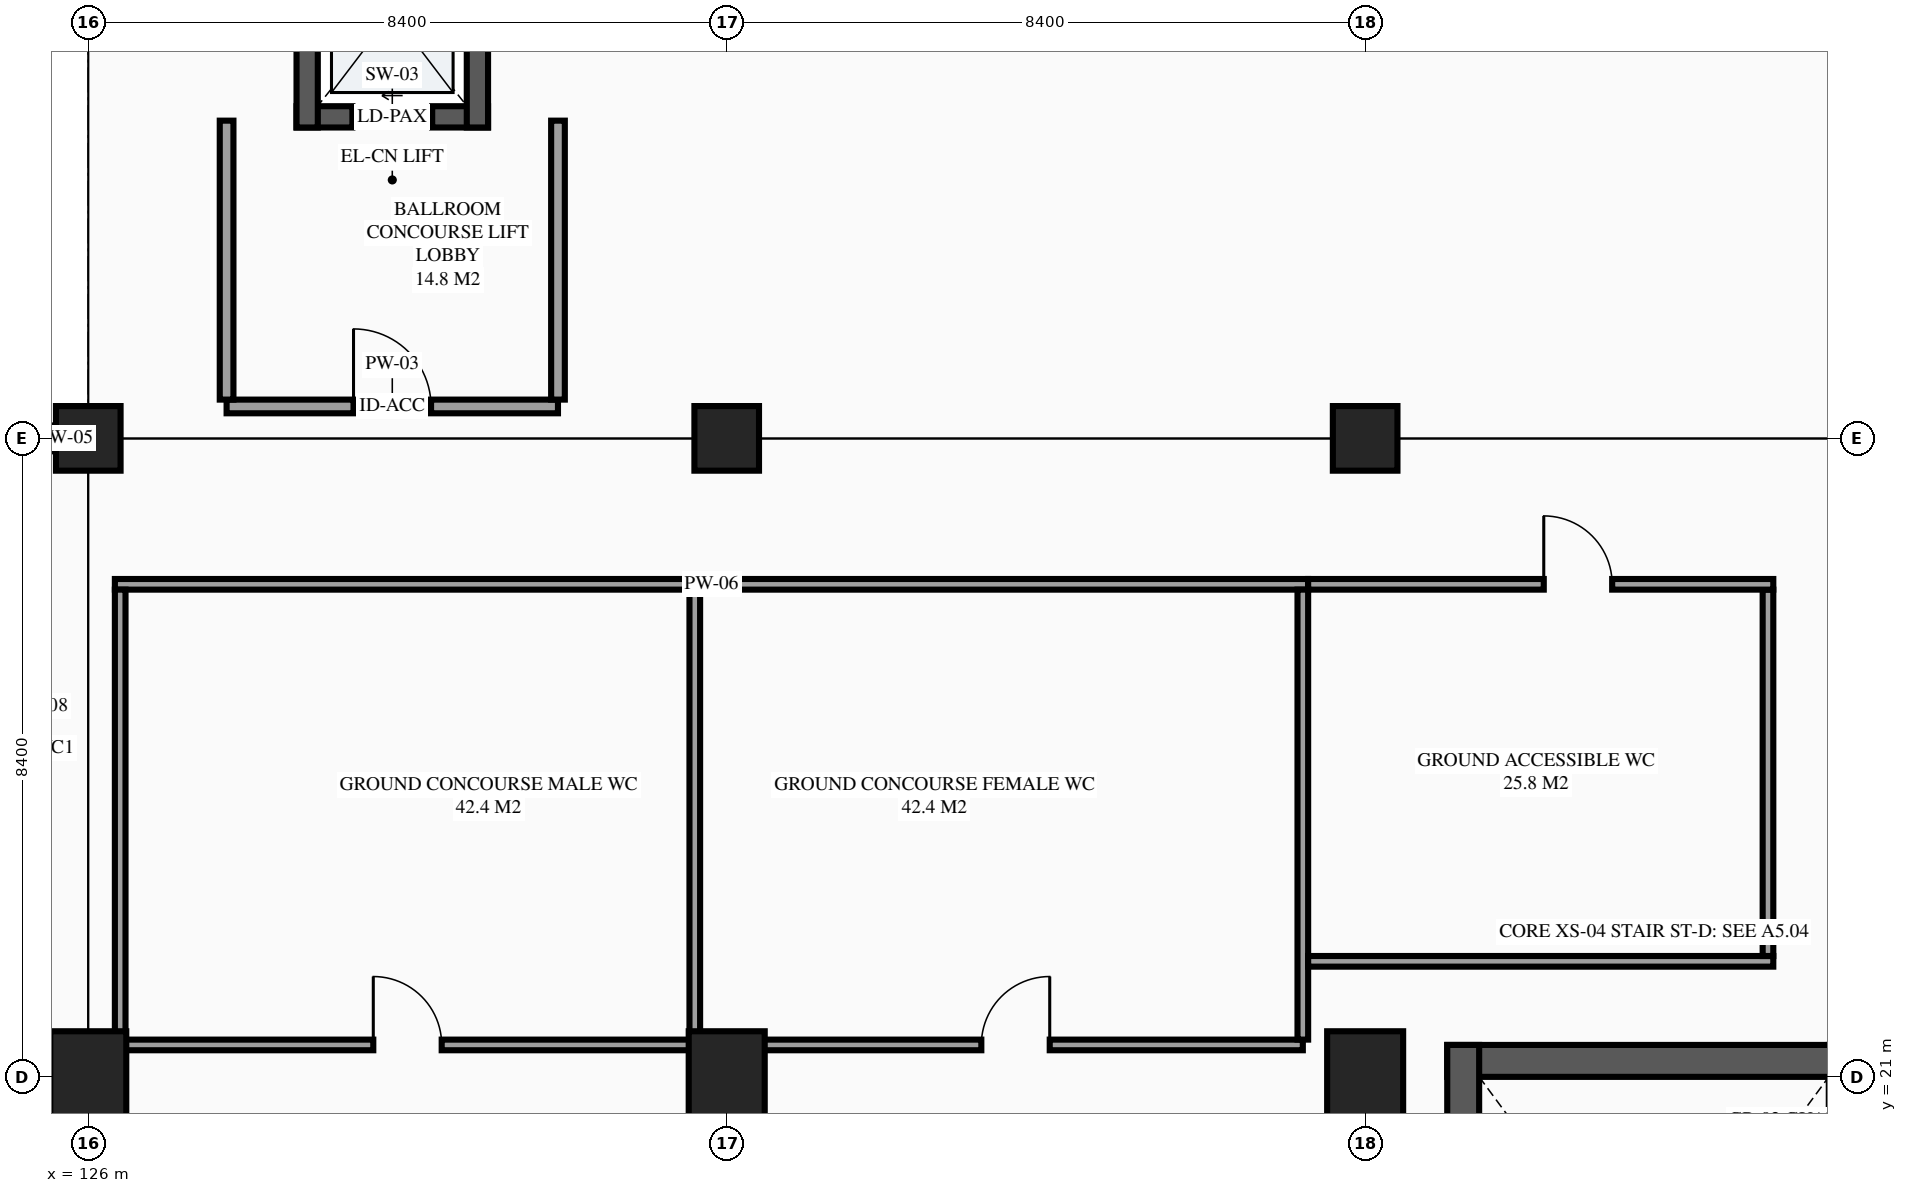
"""IFC4 building model, lengths in metres.
Left out: names, types, materials, properties, quantities, classifications, styles, units other than length and angle.
Written with IfcOpenShell. Run it as: python <this file> out.ifc"""

import sys

from ifc_helpers import new_model, si_unit, direction, frame, frame_2d, origin, origin_2d, place, context, subcontext, project, spatial, rectangle, extrude, element, fill, save


model = new_model("IFC4")
c1 = context("Model", 3, precision=1e-05, world=origin(), true_north=direction((0.0, 1.0)))
c2 = subcontext(c1, "Body", "Model", "MODEL_VIEW")
j1 = project(units=[si_unit("LENGTHUNIT", "METRE"), si_unit("PLANEANGLEUNIT", "RADIAN")], contexts=[c1])
p1 = place(None, origin())
s1 = spatial("IfcSite", under=j1, at=p1, CompositionType="ELEMENT")
p2 = place(p1, origin())
s2 = spatial("IfcBuilding", under=s1, at=p2, CompositionType="ELEMENT")
p3 = place(p2, origin())
s3 = spatial("IfcBuildingStorey", under=s2, at=p3, CompositionType="ELEMENT", Elevation=0.0)
p4 = place(p3, frame((126.0, 21.0, 0.0), z_axis=(0.0, 0.0, 1.0), x_axis=(1.0, 0.0, 0.0)))
e1 = element("IfcColumn", 1, at=p4, inside=s3, PredefinedType="COLUMN", context=c2, shape_type="SweptSolid", body=[
    extrude(rectangle(XDim=1.0, YDim=1.2, at=origin_2d()), origin(), (0.0, 0.0, 1.0), 5.4),
])
p5 = place(p3, frame((126.0, 29.4, 0.0), z_axis=(0.0, 0.0, 1.0), x_axis=(1.0, 0.0, 0.0)))
e2 = element("IfcColumn", 2, at=p5, inside=s3, PredefinedType="COLUMN", context=c2, shape_type="SweptSolid", body=[
    extrude(rectangle(XDim=0.85, YDim=0.85, at=origin_2d()), origin(), (0.0, 0.0, 1.0), 5.4),
])
p6 = place(p3, frame((134.4, 21.0, 0.0), z_axis=(0.0, 0.0, 1.0), x_axis=(1.0, 0.0, 0.0)))
e3 = element("IfcColumn", 3, at=p6, inside=s3, PredefinedType="COLUMN", context=c2, shape_type="SweptSolid", body=[
    extrude(rectangle(XDim=1.0, YDim=1.2, at=origin_2d()), origin(), (0.0, 0.0, 1.0), 5.4),
])
p7 = place(p3, frame((134.4, 29.4, 0.0), z_axis=(0.0, 0.0, 1.0), x_axis=(1.0, 0.0, 0.0)))
e4 = element("IfcColumn", 4, at=p7, inside=s3, PredefinedType="COLUMN", context=c2, shape_type="SweptSolid", body=[
    extrude(rectangle(XDim=0.85, YDim=0.85, at=origin_2d()), origin(), (0.0, 0.0, 1.0), 5.4),
])
p8 = place(p3, frame((142.8, 21.0, 0.0), z_axis=(0.0, 0.0, 1.0), x_axis=(1.0, 0.0, 0.0)))
e5 = element("IfcColumn", 5, at=p8, inside=s3, PredefinedType="COLUMN", context=c2, shape_type="SweptSolid", body=[
    extrude(rectangle(XDim=1.0, YDim=1.2, at=origin_2d()), origin(), (0.0, 0.0, 1.0), 5.4),
])
p9 = place(p3, frame((142.8, 29.4, 0.0), z_axis=(0.0, 0.0, 1.0), x_axis=(1.0, 0.0, 0.0)))
e6 = element("IfcColumn", 6, at=p9, inside=s3, PredefinedType="COLUMN", context=c2, shape_type="SweptSolid", body=[
    extrude(rectangle(XDim=0.85, YDim=0.85, at=origin_2d()), origin(), (0.0, 0.0, 1.0), 5.4),
])
p10 = place(p3, frame((126.0, 29.4, 0.0), z_axis=(0.0, 0.0, 1.0), x_axis=(-1.0, 0.0, 0.0)))
e7 = element("IfcWall", 7, at=p10, inside=s3, PredefinedType="STANDARD", context=c2, shape_type="SweptSolid", body=[
    extrude(rectangle(XDim=0.6, YDim=0.34, at=frame_2d((0.3, 0.0))), origin(), (0.0, 0.0, 1.0), 5.4),
])
p11 = place(p3, frame((128.74, 33.63, 0.0), z_axis=(0.0, 0.0, 1.0), x_axis=(1.0, 0.0, 0.0)))
e8 = element("IfcWall", 8, at=p11, inside=s3, PredefinedType="SHEAR", context=c2, shape_type="SweptSolid", body=[
    extrude(rectangle(XDim=2.52, YDim=0.28, at=frame_2d((1.26, 0.0))), origin(), (0.0, 0.0, 1.0), 5.4),
])
p12 = place(p11, frame((0.735, 0.0, 0.0)))
e9 = element("IfcOpeningElement", 9, at=p12, cuts=e8, PredefinedType="OPENING", context=c2, shape_type="SweptSolid", body=[
    extrude(rectangle(XDim=1.05, YDim=2.2, at=frame_2d((0.525, 1.1))), frame((0.0, 0.15, 0.0), z_axis=(0.0, -1.0, 0.0), x_axis=(1.0, 0.0, 0.0)), (0.0, 0.0, 1.0), 0.3),
])
for number, where, z_axis, x_axis in (
    (10, (131.12, 33.49, 0.0), (0.0, 0.0, 1.0), (0.0, 1.0, 0.0)),
    (11, (128.88, 36.51, 0.0), (0.0, 0.0, 1.0), (0.0, -1.0, 0.0)),
):
    element("IfcWall", number, at=place(p3, frame(where, z_axis=z_axis, x_axis=x_axis)), inside=s3, PredefinedType="SHEAR", context=c2, shape_type="SweptSolid", body=[
        extrude(rectangle(XDim=3.02, YDim=0.28, at=frame_2d((1.51, 0.0))), origin(), (0.0, 0.0, 1.0), 5.4),
    ])
p13 = place(p3, frame((149.32, 21.21, 0.0), z_axis=(0.0, 0.0, 1.0), x_axis=(-1.0, 0.0, 0.0)))
e12 = element("IfcWall", 12, at=p13, inside=s3, PredefinedType="SHEAR", context=c2, shape_type="SweptSolid", body=[
    extrude(rectangle(XDim=5.44, YDim=0.42, at=frame_2d((2.72, 0.0))), origin(), (0.0, 0.0, 1.0), 5.4),
])
p14 = place(p3, frame((144.09, 21.42, 0.0), z_axis=(0.0, 0.0, 1.0), x_axis=(0.0, -1.0, 0.0)))
e13 = element("IfcWall", 13, at=p14, inside=s3, PredefinedType="SHEAR", context=c2, shape_type="SweptSolid", body=[
    extrude(rectangle(XDim=9.08, YDim=0.42, at=frame_2d((4.54, 0.0))), origin(), (0.0, 0.0, 1.0), 5.4),
])
p15 = place(p3, frame((126.35, 27.48, 0.0), z_axis=(0.0, 0.0, 1.0), x_axis=(1.0, 0.0, 0.0)))
e14 = element("IfcWall", 14, at=p15, inside=s3, PredefinedType="PARTITIONING", context=c2, shape_type="SweptSolid", body=[
    extrude(rectangle(XDim=15.7, YDim=0.14, at=frame_2d((7.85, 0.0))), origin(), (0.0, 0.0, 1.0), 5.135),
])
p16 = place(p3, frame((127.82, 29.82, 0.0), z_axis=(0.0, 0.0, 1.0), x_axis=(1.0, 0.0, 0.0)))
e15 = element("IfcWall", 15, at=p16, inside=s3, PredefinedType="PARTITIONING", context=c2, shape_type="SweptSolid", body=[
    extrude(rectangle(XDim=4.36, YDim=0.18, at=frame_2d((2.18, 0.0))), origin(), (0.0, 0.0, 1.0), 5.135),
])
p17 = place(p16, frame((1.67, 0.0, 0.0)))
e16 = element("IfcOpeningElement", 16, at=p17, cuts=e15, PredefinedType="OPENING", context=c2, shape_type="SweptSolid", body=[
    extrude(rectangle(XDim=1.02, YDim=2.15, at=frame_2d((0.51, 1.075))), frame((0.0, 0.1, 0.0), z_axis=(0.0, -1.0, 0.0), x_axis=(1.0, 0.0, 0.0)), (0.0, 0.0, 1.0), 0.2),
])
for number, where, z_axis, x_axis in (
    (17, (127.82, 29.91, 0.0), (0.0, 0.0, 1.0), (0.0, 1.0, 0.0)),
    (18, (132.18, 29.91, 0.0), (0.0, 0.0, 1.0), (0.0, 1.0, 0.0)),
):
    element("IfcWall", number, at=place(p3, frame(where, z_axis=z_axis, x_axis=x_axis)), inside=s3, PredefinedType="PARTITIONING", context=c2, shape_type="SweptSolid", body=[
        extrude(rectangle(XDim=3.67, YDim=0.18, at=frame_2d((1.835, 0.0))), origin(), (0.0, 0.0, 1.0), 5.135),
    ])
p18 = place(p3, frame((126.42, 21.42, 0.0), z_axis=(0.0, 0.0, 1.0), x_axis=(1.0, 0.0, 0.0)))
e19 = element("IfcWall", 19, at=p18, inside=s3, PredefinedType="PARTITIONING", context=c2, shape_type="SweptSolid", body=[
    extrude(rectangle(XDim=7.56, YDim=0.14, at=frame_2d((3.78, 0.0))), origin(), (0.0, 0.0, 1.0), 5.135),
])
p19 = place(p18, frame((3.33, 0.0, 0.0)))
e20 = element("IfcOpeningElement", 20, at=p19, cuts=e19, PredefinedType="OPENING", context=c2, shape_type="SweptSolid", body=[
    extrude(rectangle(XDim=0.9, YDim=2.12, at=frame_2d((0.45, 1.06))), frame((0.0, 0.08, 0.0), z_axis=(0.0, -1.0, 0.0), x_axis=(1.0, 0.0, 0.0)), (0.0, 0.0, 1.0), 0.16),
])
for number, where, z_axis, x_axis in (
    (21, (126.42, 21.49, 0.0), (0.0, 0.0, 1.0), (0.0, 1.0, 0.0)),
    (22, (133.98, 21.49, 0.0), (0.0, 0.0, 1.0), (0.0, 1.0, 0.0)),
):
    element("IfcWall", number, at=place(p3, frame(where, z_axis=z_axis, x_axis=x_axis)), inside=s3, PredefinedType="PARTITIONING", context=c2, shape_type="SweptSolid", body=[
        extrude(rectangle(XDim=5.92, YDim=0.14, at=frame_2d((2.96, 0.0))), origin(), (0.0, 0.0, 1.0), 5.135),
    ])
p20 = place(p3, frame((134.42, 21.42, 0.0), z_axis=(0.0, 0.0, 1.0), x_axis=(1.0, 0.0, 0.0)))
e23 = element("IfcWall", 23, at=p20, inside=s3, PredefinedType="PARTITIONING", context=c2, shape_type="SweptSolid", body=[
    extrude(rectangle(XDim=7.56, YDim=0.14, at=frame_2d((3.78, 0.0))), origin(), (0.0, 0.0, 1.0), 5.135),
])
p21 = place(p20, frame((3.33, 0.0, 0.0)))
e24 = element("IfcOpeningElement", 24, at=p21, cuts=e23, PredefinedType="OPENING", context=c2, shape_type="SweptSolid", body=[
    extrude(rectangle(XDim=0.9, YDim=2.12, at=frame_2d((0.45, 1.06))), frame((0.0, 0.08, 0.0), z_axis=(0.0, -1.0, 0.0), x_axis=(1.0, 0.0, 0.0)), (0.0, 0.0, 1.0), 0.16),
])
p22 = place(p3, frame((141.98, 21.49, 0.0), z_axis=(0.0, 0.0, 1.0), x_axis=(0.0, 1.0, 0.0)))
e25 = element("IfcWall", 25, at=p22, inside=s3, PredefinedType="PARTITIONING", context=c2, shape_type="SweptSolid", body=[
    extrude(rectangle(XDim=5.92, YDim=0.14, at=frame_2d((2.96, 0.0))), origin(), (0.0, 0.0, 1.0), 5.135),
])
p23 = place(p3, frame((142.05, 22.52, 0.0), z_axis=(0.0, 0.0, 1.0), x_axis=(1.0, 0.0, 0.0)))
e26 = element("IfcWall", 26, at=p23, inside=s3, PredefinedType="PARTITIONING", context=c2, shape_type="SweptSolid", body=[
    extrude(rectangle(XDim=6.12, YDim=0.14, at=frame_2d((3.06, 0.0))), origin(), (0.0, 0.0, 1.0), 5.135),
])
p24 = place(p3, frame((148.1, 22.59, 0.0), z_axis=(0.0, 0.0, 1.0), x_axis=(0.0, 1.0, 0.0)))
e27 = element("IfcWall", 27, at=p24, inside=s3, PredefinedType="PARTITIONING", context=c2, shape_type="SweptSolid", body=[
    extrude(rectangle(XDim=4.82, YDim=0.14, at=frame_2d((2.41, 0.0))), origin(), (0.0, 0.0, 1.0), 5.135),
])
p25 = place(p3, frame((142.05, 27.48, 0.0), z_axis=(0.0, 0.0, 1.0), x_axis=(1.0, 0.0, 0.0)))
e28 = element("IfcWall", 28, at=p25, inside=s3, PredefinedType="PARTITIONING", context=c2, shape_type="SweptSolid", body=[
    extrude(rectangle(XDim=6.12, YDim=0.14, at=frame_2d((3.06, 0.0))), origin(), (0.0, 0.0, 1.0), 5.135),
])
p26 = place(p25, frame((3.1, 0.0, 0.0)))
e29 = element("IfcOpeningElement", 29, at=p26, cuts=e28, PredefinedType="OPENING", context=c2, shape_type="SweptSolid", body=[
    extrude(rectangle(XDim=0.9, YDim=2.12, at=frame_2d((0.45, 1.06))), frame((0.0, 0.08, 0.0), z_axis=(0.0, -1.0, 0.0), x_axis=(1.0, 0.0, 0.0)), (0.0, 0.0, 1.0), 0.16),
])
p27 = place(p12, origin())
e30 = element("IfcDoor", 30, at=p27, inside=s3, OperationType="SLIDING_TO_LEFT", PredefinedType="DOOR", context=c2, shape_type="SweptSolid", body=[
    extrude(rectangle(XDim=1.05, YDim=2.2, at=frame_2d((0.525, 1.1))), frame((0.0, 0.025, 0.0), z_axis=(0.0, -1.0, 0.0), x_axis=(1.0, 0.0, 0.0)), (0.0, 0.0, 1.0), 0.05),
])
fill(e9, e30)
p28 = place(p17, origin())
e31 = element("IfcDoor", 31, at=p28, inside=s3, OperationType="SINGLE_SWING_LEFT", PredefinedType="DOOR", context=c2, shape_type="SweptSolid", body=[
    extrude(rectangle(XDim=1.02, YDim=2.15, at=frame_2d((0.51, 1.075))), frame((0.0, 0.025, 0.0), z_axis=(0.0, -1.0, 0.0), x_axis=(1.0, 0.0, 0.0)), (0.0, 0.0, 1.0), 0.05),
])
fill(e16, e31)
p29 = place(p19, origin())
e32 = element("IfcDoor", 32, at=p29, inside=s3, OperationType="SINGLE_SWING_LEFT", PredefinedType="DOOR", context=c2, shape_type="SweptSolid", body=[
    extrude(rectangle(XDim=0.9, YDim=2.12, at=frame_2d((0.45, 1.06))), frame((0.0, 0.025, 0.0), z_axis=(0.0, -1.0, 0.0), x_axis=(1.0, 0.0, 0.0)), (0.0, 0.0, 1.0), 0.05),
])
fill(e20, e32)
p30 = place(p21, origin())
e33 = element("IfcDoor", 33, at=p30, inside=s3, OperationType="SINGLE_SWING_RIGHT", PredefinedType="DOOR", context=c2, shape_type="SweptSolid", body=[
    extrude(rectangle(XDim=0.9, YDim=2.12, at=frame_2d((0.45, 1.06))), frame((0.0, 0.025, 0.0), z_axis=(0.0, -1.0, 0.0), x_axis=(1.0, 0.0, 0.0)), (0.0, 0.0, 1.0), 0.05),
])
fill(e24, e33)
p31 = place(p26, origin())
e34 = element("IfcDoor", 34, at=p31, inside=s3, OperationType="SINGLE_SWING_LEFT", PredefinedType="DOOR", context=c2, shape_type="SweptSolid", body=[
    extrude(rectangle(XDim=0.9, YDim=2.12, at=frame_2d((0.45, 1.06))), frame((0.0, 0.025, 0.0), z_axis=(0.0, -1.0, 0.0), x_axis=(1.0, 0.0, 0.0)), (0.0, 0.0, 1.0), 0.05),
])
fill(e29, e34)
save(model, sys.argv[1])
